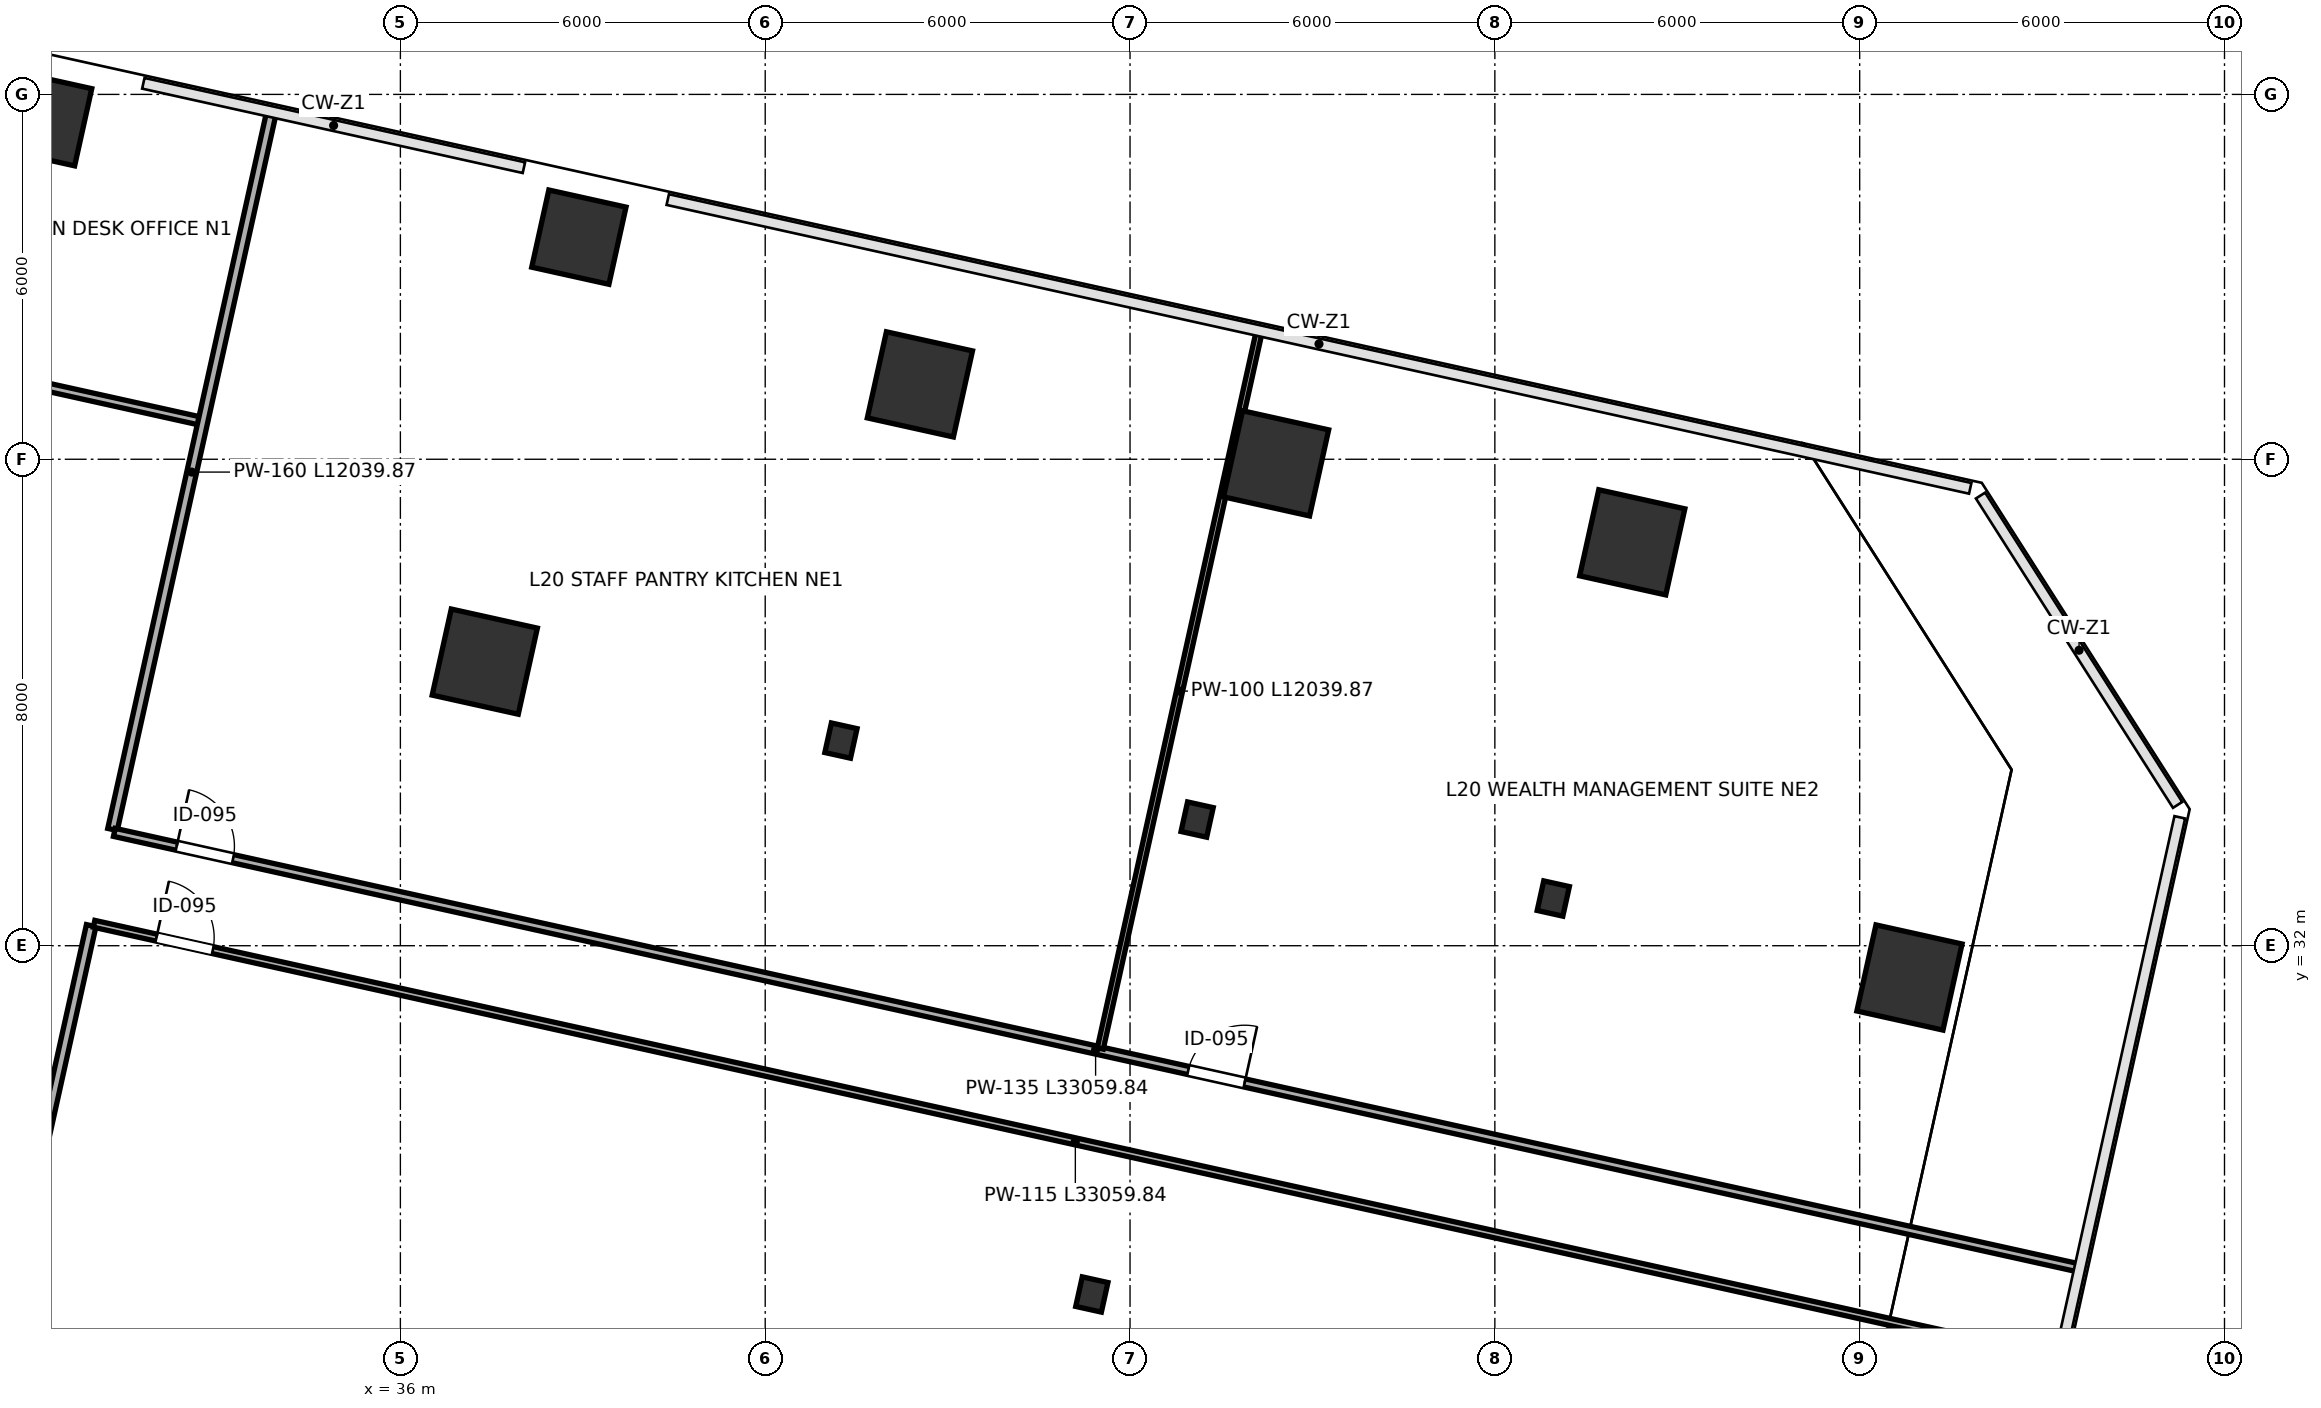
"""IFC4 building model, lengths in metres.
Left out: names, types, materials, properties, quantities, classifications, styles, units other than length and angle.
Written with IfcOpenShell. Run it as: python <this file> out.ifc"""

import sys

from ifc_helpers import new_model, si_unit, direction, frame, frame_2d, origin, origin_2d, place, context, subcontext, project, spatial, rectangle, i_section, extrude, clip, halfspace, source, transform, mapped, element, fill, save


model = new_model("IFC4")
c1 = context("Model", 3, precision=1e-05, world=origin(), true_north=direction((0.0, 1.0)))
c2 = subcontext(c1, "Body", "Model", "MODEL_VIEW")
j1 = project(units=[si_unit("LENGTHUNIT", "METRE"), si_unit("PLANEANGLEUNIT", "RADIAN")], contexts=[c1])
p1 = place(None, origin())
s1 = spatial("IfcSite", under=j1, at=p1, CompositionType="ELEMENT")
p2 = place(p1, origin())
s2 = spatial("IfcBuilding", under=s1, at=p2, CompositionType="ELEMENT")
p3 = place(p2, frame((0.0, 0.0, 91.6)))
s3 = spatial("IfcBuildingStorey", under=s2, at=p3, CompositionType="ELEMENT", Elevation=91.6)
p4 = place(p3, frame((30.149, 45.601, 0.0), z_axis=(0.069917538231, -0.045530393579, 0.996513181603), x_axis=(-0.713501049168, -0.700421397913, 0.018058742521)))
e1 = element("IfcColumn", 1, at=p4, inside=s3, PredefinedType="COLUMN", context=c2, shape_type="Clipping", body=[
    clip(clip(extrude(rectangle(XDim=1.3, YDim=1.3, at=origin_2d()), origin(), (0.0, 0.0, 1.0), 4.215), halfspace(frame((0.0, 0.0, 0.066), z_axis=(0.0, 0.0, -1.0), x_axis=(1.0, 0.0, 0.0)), False)), halfspace(frame((0.0, 0.0, 4.149), z_axis=(0.0, 0.0, 1.0), x_axis=(1.0, 0.0, 0.0)), False)),
])
p5 = place(p3, frame((37.388, 36.672, 0.0), z_axis=(0.02328194464, -0.082529281373, 0.996316650854), x_axis=(-0.998171219422, -0.057530436724, 0.018559783635)))
e2 = element("IfcColumn", 2, at=p5, inside=s3, PredefinedType="COLUMN", context=c2, shape_type="Clipping", body=[
    clip(clip(extrude(rectangle(XDim=1.45, YDim=1.45, at=origin_2d()), origin(), (0.0, 0.0, 1.0), 4.216), halfspace(frame((0.0, 0.0, 0.075), z_axis=(0.0, 0.0, -1.0), x_axis=(1.0, 0.0, 0.0)), False)), halfspace(frame((0.0, 0.0, 4.14), z_axis=(0.0, 0.0, 1.0), x_axis=(1.0, 0.0, 0.0)), False)),
])
p6 = place(p3, frame((38.935, 43.653, 0.0), z_axis=(0.059174275634, -0.090726184321, 0.99411627317), x_axis=(-0.935280491187, -0.353129955042, 0.023444352355)))
e3 = element("IfcColumn", 3, at=p6, inside=s3, PredefinedType="COLUMN", context=c2, shape_type="Clipping", body=[
    clip(clip(extrude(rectangle(XDim=1.3, YDim=1.3, at=origin_2d()), origin(), (0.0, 0.0, 1.0), 4.225), halfspace(frame((0.0, 0.0, 0.085), z_axis=(0.0, 0.0, -1.0), x_axis=(1.0, 0.0, 0.0)), False)), halfspace(frame((0.0, 0.0, 4.14), z_axis=(0.0, 0.0, 1.0), x_axis=(1.0, 0.0, 0.0)), False)),
])
p7 = place(p3, frame((43.246, 35.373, 0.0), z_axis=(0.016170968921, -0.112388234004, 0.993532779843), x_axis=(-0.996969796635, 0.073805526652, 0.02457577736)))
e4 = element("IfcColumn", 4, at=p7, inside=s3, PredefinedType="COLUMN", context=c2, shape_type="Clipping", body=[
    clip(clip(extrude(i_section(OverallWidth=0.432, OverallDepth=0.498, WebThickness=0.056, FlangeThickness=0.089, FilletRadius=0.015, at=origin_2d()), origin(), (0.0, 0.0, 1.0), 4.227), halfspace(frame((0.0, 0.0, 0.034), z_axis=(0.0, 0.0, -1.0), x_axis=(1.0, 0.0, 0.0)), False)), halfspace(frame((0.0, 0.0, 4.193), z_axis=(0.0, 0.0, 1.0), x_axis=(1.0, 0.0, 0.0)), False)),
])
p8 = place(p3, frame((44.544, 41.231, 0.0), z_axis=(0.046237032236, -0.119224666664, 0.99179010668), x_axis=(-0.987859289965, -0.152865881396, 0.02767752763)))
e5 = element("IfcColumn", 5, at=p8, inside=s3, PredefinedType="COLUMN", context=c2, shape_type="Clipping", body=[
    clip(clip(extrude(rectangle(XDim=1.45, YDim=1.45, at=origin_2d()), origin(), (0.0, 0.0, 1.0), 4.235), halfspace(frame((0.0, 0.0, 0.112), z_axis=(0.0, 0.0, -1.0), x_axis=(1.0, 0.0, 0.0)), False)), halfspace(frame((0.0, 0.0, 4.122), z_axis=(0.0, 0.0, 1.0), x_axis=(1.0, 0.0, 0.0)), False)),
])
p9 = place(p3, frame((47.372, 26.264, 0.0), z_axis=(-0.030981497177, -0.132794298308, 0.990659286117), x_axis=(-0.902046991682, 0.430627634873, 0.029513808318)))
e6 = element("IfcColumn", 6, at=p9, inside=s3, PredefinedType="COLUMN", context=c2, shape_type="Clipping", body=[
    clip(clip(extrude(i_section(OverallWidth=0.432, OverallDepth=0.498, WebThickness=0.056, FlangeThickness=0.089, FilletRadius=0.015, at=origin_2d()), origin(), (0.0, 0.0, 1.0), 4.24), halfspace(frame((0.0, 0.0, 0.041), z_axis=(0.0, 0.0, -1.0), x_axis=(1.0, 0.0, 0.0)), False)), halfspace(frame((0.0, 0.0, 4.199), z_axis=(0.0, 0.0, 1.0), x_axis=(1.0, 0.0, 0.0)), False)),
])
p10 = place(p3, frame((49.104, 34.075, 0.0), z_axis=(0.009090987386, -0.142003524493, 0.989824405124), x_axis=(-0.987988794605, 0.15142528952, 0.030798107544)))
e7 = element("IfcColumn", 7, at=p10, inside=s3, PredefinedType="COLUMN", context=c2, shape_type="Clipping", body=[
    clip(clip(extrude(i_section(OverallWidth=0.432, OverallDepth=0.498, WebThickness=0.056, FlangeThickness=0.089, FilletRadius=0.015, at=origin_2d()), origin(), (0.0, 0.0, 1.0), 4.243), halfspace(frame((0.0, 0.0, 0.042), z_axis=(0.0, 0.0, -1.0), x_axis=(1.0, 0.0, 0.0)), False)), halfspace(frame((0.0, 0.0, 4.201), z_axis=(0.0, 0.0, 1.0), x_axis=(1.0, 0.0, 0.0)), False)),
])
p11 = place(p3, frame((50.402, 39.933, 0.0), z_axis=(0.039057317464, -0.148819866985, 0.988092694611), x_axis=(-0.998605028501, -0.040975813419, 0.033301347835)))
e8 = element("IfcColumn", 8, at=p11, inside=s3, PredefinedType="COLUMN", context=c2, shape_type="Clipping", body=[
    clip(clip(extrude(rectangle(XDim=1.45, YDim=1.45, at=origin_2d()), origin(), (0.0, 0.0, 1.0), 4.25), halfspace(frame((0.0, 0.0, 0.135), z_axis=(0.0, 0.0, -1.0), x_axis=(1.0, 0.0, 0.0)), False)), halfspace(frame((0.0, 0.0, 4.115), z_axis=(0.0, 0.0, 1.0), x_axis=(1.0, 0.0, 0.0)), False)),
])
p12 = place(p3, frame((54.961, 32.776, 0.0), z_axis=(0.002118993695, -0.17129486873, 0.98521752817), x_axis=(-0.978858988492, 0.201147495706, 0.037077831903)))
e9 = element("IfcColumn", 9, at=p12, inside=s3, PredefinedType="COLUMN", context=c2, shape_type="Clipping", body=[
    clip(clip(extrude(i_section(OverallWidth=0.432, OverallDepth=0.498, WebThickness=0.056, FlangeThickness=0.089, FilletRadius=0.015, at=origin_2d()), origin(), (0.0, 0.0, 1.0), 4.263), halfspace(frame((0.0, 0.0, 0.051), z_axis=(0.0, 0.0, -1.0), x_axis=(1.0, 0.0, 0.0)), False)), halfspace(frame((0.0, 0.0, 4.212), z_axis=(0.0, 0.0, 1.0), x_axis=(1.0, 0.0, 0.0)), False)),
])
p13 = place(p3, frame((56.26, 38.634, 0.0), z_axis=(0.031959024202, -0.177918574806, 0.983526106166), x_axis=(-0.998552255123, 0.036913842194, 0.039124954224)))
e10 = element("IfcColumn", 10, at=p13, inside=s3, PredefinedType="COLUMN", context=c2, shape_type="Clipping", body=[
    clip(clip(extrude(rectangle(XDim=1.45, YDim=1.45, at=origin_2d()), origin(), (0.0, 0.0, 1.0), 4.27), halfspace(frame((0.0, 0.0, 0.16), z_axis=(0.0, 0.0, -1.0), x_axis=(1.0, 0.0, 0.0)), False)), halfspace(frame((0.0, 0.0, 4.111), z_axis=(0.0, 0.0, 1.0), x_axis=(1.0, 0.0, 0.0)), False)),
])
p14 = place(p3, frame((60.819, 31.477, 0.0), z_axis=(-0.004841088543, -0.200022387801, 0.979779367123), x_axis=(-0.970879185763, 0.235623099387, 0.043305446391)))
e11 = element("IfcColumn", 11, at=p14, inside=s3, PredefinedType="COLUMN", context=c2, shape_type="Clipping", body=[
    clip(clip(extrude(rectangle(XDim=1.45, YDim=1.45, at=origin_2d()), origin(), (0.0, 0.0, 1.0), 4.287), halfspace(frame((0.0, 0.0, 0.177), z_axis=(0.0, 0.0, -1.0), x_axis=(1.0, 0.0, 0.0)), False)), halfspace(frame((0.0, 0.0, 4.109), z_axis=(0.0, 0.0, 1.0), x_axis=(1.0, 0.0, 0.0)), False)),
])
p15 = place(p3, frame((6.744, 46.385, 0.0), z_axis=(0.0, 0.0, 1.0), x_axis=(0.976297719541, -0.216431889561, 0.0)))
e12 = element("IfcWall", 12, at=p15, inside=s3, PredefinedType="PARTITIONING", context=c2, shape_type="SweptSolid", body=[
    extrude(rectangle(XDim=26.6, YDim=0.135, at=frame_2d((13.3, 0.0))), origin(), (0.0, 0.0, 1.0), 3.96),
])
p16 = place(p15, frame((0.91, 0.0, 0.0)))
e13 = element("IfcOpeningElement", 13, at=p16, cuts=e12, PredefinedType="OPENING", context=c2, shape_type="SweptSolid", body=[
    extrude(rectangle(XDim=0.95, YDim=2.15, at=frame_2d((0.475, 1.075))), frame((0.0, 0.078, 0.0), z_axis=(0.0, -1.0, 0.0), x_axis=(1.0, 0.0, 0.0)), (0.0, 0.0, 1.0), 0.155),
])
p17 = place(p3, frame((31.265, 33.912, 0.0), z_axis=(0.0, 0.0, 1.0), x_axis=(0.216425867349, 0.976299054564, 0.0)))
e14 = element("IfcWall", 14, at=p17, inside=s3, PredefinedType="PARTITIONING", context=c2, shape_type="SweptSolid", body=[
    extrude(rectangle(XDim=12.04, YDim=0.16, at=frame_2d((6.02, 0.0))), origin(), (0.0, 0.0, 1.0), 3.095),
])
p18 = place(p3, frame((26.504, 12.433, 0.0), z_axis=(0.0, 0.0, 1.0), x_axis=(0.216434476574, 0.976297146032, 0.0)))
e15 = element("IfcWall", 15, at=p18, inside=s3, PredefinedType="PARTITIONING", context=c2, shape_type="SweptSolid", body=[
    extrude(rectangle(XDim=20.38, YDim=0.16, at=frame_2d((10.19, 0.0))), origin(), (0.0, 0.0, 1.0), 3.96),
])
p19 = place(p3, frame((31.296, 33.864, 0.0), z_axis=(0.0, 0.0, 1.0), x_axis=(0.976295884124, -0.216440168738, 0.0)))
e16 = element("IfcWall", 16, at=p19, inside=s3, PredefinedType="PARTITIONING", context=c2, shape_type="SweptSolid", body=[
    extrude(rectangle(XDim=33.06, YDim=0.135, at=frame_2d((16.53, 0.0))), origin(), (0.0, 0.0, 1.0), 3.095),
])
p20 = place(p19, frame((1.05, 0.0, 0.0)))
e17 = element("IfcOpeningElement", 17, at=p20, cuts=e16, PredefinedType="OPENING", context=c2, shape_type="SweptSolid", body=[
    extrude(rectangle(XDim=0.95, YDim=2.15, at=frame_2d((0.475, 1.075))), frame((0.0, 0.078, 0.0), z_axis=(0.0, -1.0, 0.0), x_axis=(1.0, 0.0, 0.0)), (0.0, 0.0, 1.0), 0.155),
])
p21 = place(p19, frame((18.09, 0.0, 0.0)))
e18 = element("IfcOpeningElement", 18, at=p21, cuts=e16, PredefinedType="OPENING", context=c2, shape_type="SweptSolid", body=[
    extrude(rectangle(XDim=0.95, YDim=2.15, at=frame_2d((0.475, 1.075))), frame((0.0, 0.078, 0.0), z_axis=(0.0, -1.0, 0.0), x_axis=(1.0, 0.0, 0.0)), (0.0, 0.0, 1.0), 0.155),
])
p22 = place(p3, frame((30.962, 32.361, 0.0), z_axis=(0.0, 0.0, 1.0), x_axis=(0.976295538171, -0.216441729221, 0.0)))
e19 = element("IfcWall", 19, at=p22, inside=s3, PredefinedType="PARTITIONING", context=c2, shape_type="SweptSolid", body=[
    extrude(rectangle(XDim=33.06, YDim=0.115, at=frame_2d((16.53, 0.0))), origin(), (0.0, 0.0, 1.0), 3.095),
])
p23 = place(p22, frame((1.05, 0.0, 0.0)))
e20 = element("IfcOpeningElement", 20, at=p23, cuts=e19, PredefinedType="OPENING", context=c2, shape_type="SweptSolid", body=[
    extrude(rectangle(XDim=0.95, YDim=2.15, at=frame_2d((0.475, 1.075))), frame((0.0, 0.067, 0.0), z_axis=(0.0, -1.0, 0.0), x_axis=(1.0, 0.0, 0.0)), (0.0, 0.0, 1.0), 0.135),
])
p24 = place(p3, frame((47.511, 30.31, 0.0), z_axis=(0.0, 0.0, 1.0), x_axis=(0.216425867349, 0.976299054564, 0.0)))
e21 = element("IfcWall", 21, at=p24, inside=s3, PredefinedType="PARTITIONING", context=c2, shape_type="SweptSolid", body=[
    extrude(rectangle(XDim=12.04, YDim=0.1, at=frame_2d((6.02, 0.0))), origin(), (0.0, 0.0, 1.0), 3.323),
])
m1 = source(origin(), c2, "Body", "SweptSolid", [
    extrude(rectangle(XDim=0.95, YDim=2.15, at=frame_2d((0.475, 1.075))), frame((0.0, 0.025, 0.0), z_axis=(0.0, -1.0, 0.0), x_axis=(1.0, 0.0, 0.0)), (0.0, 0.0, 1.0), 0.05),
])
p25 = place(p20, origin())
e22 = element("IfcDoor", 22, at=p25, inside=s3, OperationType="SINGLE_SWING_LEFT", PredefinedType="DOOR", context=c2, shape_type="MappedRepresentation", body=[
    mapped(m1, transform((0.0, 0.0, 0.0), scale=1.0)),
])
fill(e17, e22)
p26 = place(p21, origin())
e23 = element("IfcDoor", 23, at=p26, inside=s3, OperationType="SINGLE_SWING_RIGHT", PredefinedType="DOOR", context=c2, shape_type="MappedRepresentation", body=[
    mapped(m1, transform((0.0, 0.0, 0.0), scale=1.0)),
])
fill(e18, e23)
p27 = place(p23, origin())
e24 = element("IfcDoor", 24, at=p27, inside=s3, OperationType="SINGLE_SWING_LEFT", PredefinedType="DOOR", context=c2, shape_type="MappedRepresentation", body=[
    mapped(m1, transform((0.0, 0.0, 0.0), scale=1.0)),
])
fill(e20, e24)
save(model, sys.argv[1])
